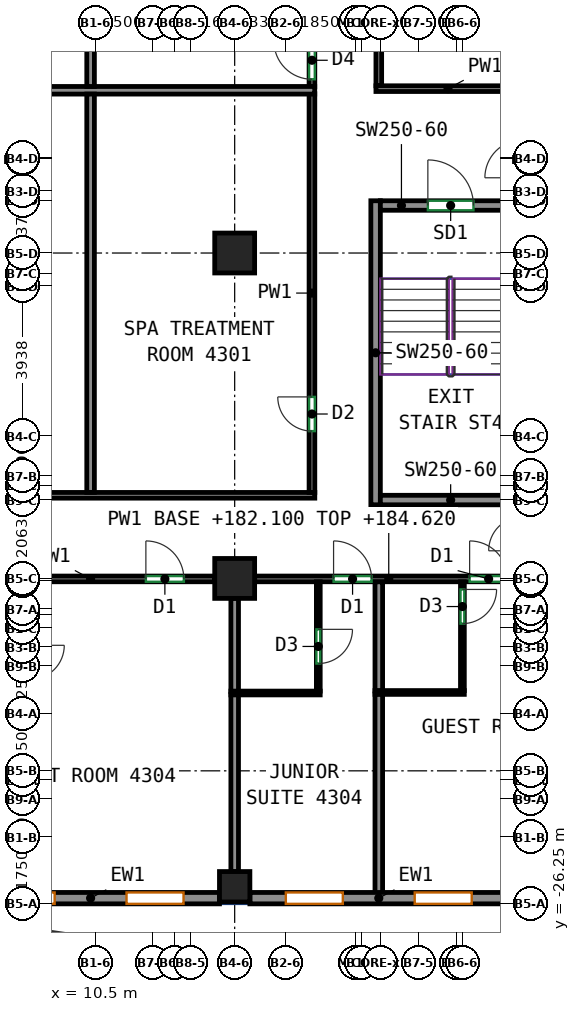
"""IFC4 building model, lengths in metres.
Left out: names, types, materials, properties, quantities, classifications, styles, units other than length and angle.
Written with IfcOpenShell. Run it as: python <this file> out.ifc"""

import sys

from ifc_helpers import new_model, si_unit, direction, frame, frame_2d, origin, origin_2d, place, context, subcontext, project, spatial, rectangle, extrude, source, transform, mapped, element, fill, save


model = new_model("IFC4")
c1 = context("Model", 3, precision=1e-05, world=origin(), true_north=direction((0.0, 1.0)))
c2 = subcontext(c1, "Body", "Model", "MODEL_VIEW")
j1 = project(units=[si_unit("LENGTHUNIT", "METRE"), si_unit("PLANEANGLEUNIT", "RADIAN")], contexts=[c1])
p1 = place(None, origin())
s1 = spatial("IfcSite", under=j1, at=p1, CompositionType="ELEMENT")
p2 = place(p1, origin())
s2 = spatial("IfcBuilding", under=s1, at=p2, CompositionType="ELEMENT")
p3 = place(p2, frame((0.0, 0.0, 182.1)))
s3 = spatial("IfcBuildingStorey", under=s2, at=p3, CompositionType="ELEMENT", Elevation=182.1)
m1 = source(origin(), c2, "Body", "SweptSolid", [
    extrude(rectangle(XDim=0.8, YDim=0.8, at=origin_2d()), origin(), (0.0, 0.0, 1.0), 3.12),
])
p4 = place(p3, frame((14.167, -25.8, 0.0), z_axis=(0.0, 0.0, 1.0), x_axis=(1.0, 0.0, 0.0)))
e1 = element("IfcColumn", 1, at=p4, inside=s3, PredefinedType="COLUMN", context=c2, shape_type="MappedRepresentation", body=[
    mapped(m1, transform((0.0, 0.0, 0.0))),
])
m2 = source(origin(), c2, "Body", "SweptSolid", [
    extrude(rectangle(XDim=1.05, YDim=1.05, at=origin_2d()), origin(), (0.0, 0.0, 1.0), 3.12),
])
for number, where, z_axis, x_axis in (
    (2, (14.167, -17.688, 0.0), (0.0, 0.0, 1.0), (1.0, 0.0, 0.0)),
    (3, (14.167, -9.125, 0.0), (0.0, 0.0, 1.0), (1.0, 0.0, 0.0)),
):
    element("IfcColumn", number, at=place(p3, frame(where, z_axis=z_axis, x_axis=x_axis)), inside=s3, PredefinedType="COLUMN", context=c2, shape_type="MappedRepresentation", body=[
        mapped(m2, transform((0.0, 0.0, 0.0))),
    ])
m3 = source(origin(), c2, "Body", "SweptSolid", [
    extrude(rectangle(XDim=8.0, YDim=0.25, at=frame_2d((4.0, 0.0))), origin(), (0.0, 0.0, 1.0), 3.12),
])
p5 = place(p3, frame((17.875, -15.75, 0.0), z_axis=(0.0, 0.0, 1.0), x_axis=(0.0, 1.0, 0.0)))
e4 = element("IfcWall", 4, at=p5, inside=s3, PredefinedType="SHEAR", context=c2, shape_type="MappedRepresentation", body=[
    mapped(m3, transform((0.0, 0.0, 0.0))),
])
m4 = source(origin(), c2, "Body", "SweptSolid", [
    extrude(rectangle(XDim=3.7, YDim=0.25, at=frame_2d((1.85, 0.0))), origin(), (0.0, 0.0, 1.0), 3.12),
])
p6 = place(p3, frame((18.0, -15.625, 0.0), z_axis=(0.0, 0.0, 1.0), x_axis=(1.0, 0.0, 0.0)))
e5 = element("IfcWall", 5, at=p6, inside=s3, PredefinedType="SHEAR", context=c2, shape_type="MappedRepresentation", body=[
    mapped(m4, transform((0.0, 0.0, 0.0))),
])
p7 = place(p3, frame((18.0, -7.875, 0.0), z_axis=(0.0, 0.0, 1.0), x_axis=(1.0, 0.0, 0.0)))
e6 = element("IfcWall", 6, at=p7, inside=s3, PredefinedType="SHEAR", context=c2, shape_type="MappedRepresentation", body=[
    mapped(m4, transform((0.0, 0.0, 0.0))),
])
p8 = place(p7, frame((1.25, 0.0, 0.0)))
e7 = element("IfcOpeningElement", 7, at=p8, cuts=e6, PredefinedType="OPENING", context=c2, shape_type="SweptSolid", body=[
    extrude(rectangle(XDim=1.2, YDim=2.1, at=frame_2d((0.6, 1.05))), frame((0.0, 0.135, 0.0), z_axis=(0.0, -1.0, 0.0), x_axis=(1.0, 0.0, 0.0)), (0.0, 0.0, 1.0), 0.27),
])
m5 = source(origin(), c2, "Body", "SweptSolid", [
    extrude(rectangle(XDim=6.783, YDim=0.3, at=frame_2d((3.392, 0.0))), origin(), (0.0, 0.0, 1.0), 3.12),
])
p9 = place(p3, frame((6.983, -26.1, 0.0), z_axis=(0.0, 0.0, 1.0), x_axis=(1.0, 0.0, 0.0)))
e8 = element("IfcWall", 8, at=p9, inside=s3, PredefinedType="SOLIDWALL", context=c2, shape_type="MappedRepresentation", body=[
    mapped(m5, transform((0.0, 0.0, 0.0))),
])
p10 = place(p9, frame((0.946, 0.0, 0.85)))
e9 = element("IfcOpeningElement", 9, at=p10, cuts=e8, PredefinedType="OPENING", context=c2, shape_type="SweptSolid", body=[
    extrude(rectangle(XDim=1.5, YDim=1.95, at=frame_2d((0.75, 0.975))), frame((0.0, 0.16, 0.0), z_axis=(0.0, -1.0, 0.0), x_axis=(1.0, 0.0, 0.0)), (0.0, 0.0, 1.0), 0.32),
])
p11 = place(p9, frame((4.338, 0.0, 0.85)))
e10 = element("IfcOpeningElement", 10, at=p11, cuts=e8, PredefinedType="OPENING", context=c2, shape_type="SweptSolid", body=[
    extrude(rectangle(XDim=1.5, YDim=1.95, at=frame_2d((0.75, 0.975))), frame((0.0, 0.16, 0.0), z_axis=(0.0, -1.0, 0.0), x_axis=(1.0, 0.0, 0.0)), (0.0, 0.0, 1.0), 0.32),
])
m6 = source(origin(), c2, "Body", "SweptSolid", [
    extrude(rectangle(XDim=6.783, YDim=0.3, at=frame_2d((3.392, 0.0))), origin(), (0.0, 0.0, 1.0), 3.12),
])
p12 = place(p3, frame((14.567, -26.1, 0.0), z_axis=(0.0, 0.0, 1.0), x_axis=(1.0, 0.0, 0.0)))
e11 = element("IfcWall", 11, at=p12, inside=s3, PredefinedType="SOLIDWALL", context=c2, shape_type="MappedRepresentation", body=[
    mapped(m6, transform((0.0, 0.0, 0.0))),
])
p13 = place(p12, frame((0.946, 0.0, 0.85)))
e12 = element("IfcOpeningElement", 12, at=p13, cuts=e11, PredefinedType="OPENING", context=c2, shape_type="SweptSolid", body=[
    extrude(rectangle(XDim=1.5, YDim=1.95, at=frame_2d((0.75, 0.975))), frame((0.0, 0.16, 0.0), z_axis=(0.0, -1.0, 0.0), x_axis=(1.0, 0.0, 0.0)), (0.0, 0.0, 1.0), 0.32),
])
p14 = place(p12, frame((4.337, 0.0, 0.85)))
e13 = element("IfcOpeningElement", 13, at=p14, cuts=e11, PredefinedType="OPENING", context=c2, shape_type="SweptSolid", body=[
    extrude(rectangle(XDim=1.5, YDim=1.95, at=frame_2d((0.75, 0.975))), frame((0.0, 0.16, 0.0), z_axis=(0.0, -1.0, 0.0), x_axis=(1.0, 0.0, 0.0)), (0.0, 0.0, 1.0), 0.32),
])
p15 = place(p3, frame((7.108, -17.7, 0.0), z_axis=(0.0, 0.0, 1.0), x_axis=(1.0, 0.0, 0.0)))
e14 = element("IfcWall", 14, at=p15, inside=s3, PredefinedType="PARTITIONING", context=c2, shape_type="SweptSolid", body=[
    extrude(rectangle(XDim=6.534, YDim=0.15, at=frame_2d((3.267, 0.0))), origin(), (0.0, 0.0, 1.0), 3.12),
])
p16 = place(p15, frame((4.722, 0.0, 0.0)))
e15 = element("IfcOpeningElement", 15, at=p16, cuts=e14, PredefinedType="OPENING", context=c2, shape_type="SweptSolid", body=[
    extrude(rectangle(XDim=1.0, YDim=2.1, at=frame_2d((0.5, 1.05))), frame((0.0, 0.085, 0.0), z_axis=(0.0, -1.0, 0.0), x_axis=(1.0, 0.0, 0.0)), (0.0, 0.0, 1.0), 0.17),
])
p17 = place(p3, frame((14.692, -17.7, 0.0), z_axis=(0.0, 0.0, 1.0), x_axis=(1.0, 0.0, 0.0)))
e16 = element("IfcWall", 16, at=p17, inside=s3, PredefinedType="PARTITIONING", context=c2, shape_type="SweptSolid", body=[
    extrude(rectangle(XDim=7.058, YDim=0.15, at=frame_2d((3.529, 0.0))), origin(), (0.0, 0.0, 1.0), 2.52),
])
p18 = place(p17, frame((2.077, 0.0, 0.0)))
e17 = element("IfcOpeningElement", 17, at=p18, cuts=e16, PredefinedType="OPENING", context=c2, shape_type="SweptSolid", body=[
    extrude(rectangle(XDim=1.0, YDim=2.1, at=frame_2d((0.5, 1.05))), frame((0.0, 0.085, 0.0), z_axis=(0.0, -1.0, 0.0), x_axis=(1.0, 0.0, 0.0)), (0.0, 0.0, 1.0), 0.17),
])
p19 = place(p17, frame((5.657, 0.0, 0.0)))
e18 = element("IfcOpeningElement", 18, at=p19, cuts=e16, PredefinedType="OPENING", context=c2, shape_type="SweptSolid", body=[
    extrude(rectangle(XDim=1.0, YDim=2.1, at=frame_2d((0.5, 1.05))), frame((0.0, 0.085, 0.0), z_axis=(0.0, -1.0, 0.0), x_axis=(1.0, 0.0, 0.0)), (0.0, 0.0, 1.0), 0.17),
])
p20 = place(p3, frame((17.959, -4.725, 0.0), z_axis=(0.0, 0.0, 1.0), x_axis=(0.0, 1.0, 0.0)))
e19 = element("IfcWall", 19, at=p20, inside=s3, PredefinedType="PARTITIONING", context=c2, shape_type="SweptSolid", body=[
    extrude(rectangle(XDim=8.35, YDim=0.15, at=frame_2d((4.175, 0.0))), origin(), (0.0, 0.0, 1.0), 3.12),
])
p21 = place(p20, frame((4.531, 0.0, 0.0)))
e20 = element("IfcOpeningElement", 20, at=p21, cuts=e19, PredefinedType="OPENING", context=c2, shape_type="SweptSolid", body=[
    extrude(rectangle(XDim=0.9, YDim=2.1, at=frame_2d((0.45, 1.05))), frame((0.0, 0.085, 0.0), z_axis=(0.0, -1.0, 0.0), x_axis=(1.0, 0.0, 0.0)), (0.0, 0.0, 1.0), 0.17),
])
p22 = place(p3, frame((17.884, -4.8, 0.0), z_axis=(0.0, 0.0, 1.0), x_axis=(1.0, 0.0, 0.0)))
e21 = element("IfcWall", 21, at=p22, inside=s3, PredefinedType="PARTITIONING", context=c2, shape_type="SweptSolid", body=[
    extrude(rectangle(XDim=3.793, YDim=0.15, at=frame_2d((1.896, 0.0))), origin(), (0.0, 0.0, 1.0), 3.12),
])
p23 = place(p3, frame((16.2, -4.753, 0.0), z_axis=(0.0, 0.0, 1.0), x_axis=(0.0, 1.0, 0.0)))
e22 = element("IfcWall", 22, at=p23, inside=s3, PredefinedType="PARTITIONING", context=c2, shape_type="SweptSolid", body=[
    extrude(rectangle(XDim=8.378, YDim=0.15, at=frame_2d((4.189, 0.0))), origin(), (0.0, 0.0, 1.0), 3.12),
])
p24 = place(p23, frame((0.2, 0.0, 0.0)))
e23 = element("IfcOpeningElement", 23, at=p24, cuts=e22, PredefinedType="OPENING", context=c2, shape_type="SweptSolid", body=[
    extrude(rectangle(XDim=1.0, YDim=2.1, at=frame_2d((0.5, 1.05))), frame((0.0, 0.085, 0.0), z_axis=(0.0, -1.0, 0.0), x_axis=(1.0, 0.0, 0.0)), (0.0, 0.0, 1.0), 0.17),
])
p25 = place(p3, frame((-4.802, -15.5, 0.0), z_axis=(0.0, 0.0, 1.0), x_axis=(1.0, 0.0, 0.0)))
e24 = element("IfcWall", 24, at=p25, inside=s3, PredefinedType="PARTITIONING", context=c2, shape_type="SweptSolid", body=[
    extrude(rectangle(XDim=21.077, YDim=0.15, at=frame_2d((10.539, 0.0))), origin(), (0.0, 0.0, 1.0), 3.12),
])
p26 = place(p25, frame((6.372, 0.0, 0.0)))
e25 = element("IfcOpeningElement", 25, at=p26, cuts=e24, PredefinedType="OPENING", context=c2, shape_type="SweptSolid", body=[
    extrude(rectangle(XDim=0.9, YDim=2.1, at=frame_2d((0.45, 1.05))), frame((0.0, 0.085, 0.0), z_axis=(0.0, -1.0, 0.0), x_axis=(1.0, 0.0, 0.0)), (0.0, 0.0, 1.0), 0.17),
])
p27 = place(p25, frame((7.815, 0.0, 0.0)))
e26 = element("IfcOpeningElement", 26, at=p27, cuts=e24, PredefinedType="OPENING", context=c2, shape_type="SweptSolid", body=[
    extrude(rectangle(XDim=0.9, YDim=2.1, at=frame_2d((0.45, 1.05))), frame((0.0, 0.085, 0.0), z_axis=(0.0, -1.0, 0.0), x_axis=(1.0, 0.0, 0.0)), (0.0, 0.0, 1.0), 0.17),
])
p28 = place(p3, frame((16.2, -15.425, 0.0), z_axis=(0.0, 0.0, 1.0), x_axis=(0.0, 1.0, 0.0)))
e27 = element("IfcWall", 27, at=p28, inside=s3, PredefinedType="PARTITIONING", context=c2, shape_type="SweptSolid", body=[
    extrude(rectangle(XDim=10.492, YDim=0.15, at=frame_2d((5.246, 0.0))), origin(), (0.0, 0.0, 1.0), 3.12),
])
p29 = place(p28, frame((1.614, 0.0, 0.0)))
e28 = element("IfcOpeningElement", 28, at=p29, cuts=e27, PredefinedType="OPENING", context=c2, shape_type="SweptSolid", body=[
    extrude(rectangle(XDim=0.9, YDim=2.1, at=frame_2d((0.45, 1.05))), frame((0.0, 0.085, 0.0), z_axis=(0.0, -1.0, 0.0), x_axis=(1.0, 0.0, 0.0)), (0.0, 0.0, 1.0), 0.17),
])
p30 = place(p3, frame((14.167, -25.4, 0.0), z_axis=(0.0, 0.0, 1.0), x_axis=(0.0, 1.0, 0.0)))
e29 = element("IfcWall", 29, at=p30, inside=s3, PredefinedType="PARTITIONING", context=c2, shape_type="SweptSolid", body=[
    extrude(rectangle(XDim=4.658, YDim=0.2, at=frame_2d((2.329, 0.0))), origin(), (0.0, 0.0, 1.0), 3.12),
])
p31 = place(p3, frame((14.167, -20.662, 0.0), z_axis=(0.0, 0.0, 1.0), x_axis=(0.0, 1.0, 0.0)))
e30 = element("IfcWall", 30, at=p31, inside=s3, PredefinedType="PARTITIONING", context=c2, shape_type="SweptSolid", body=[
    extrude(rectangle(XDim=2.45, YDim=0.2, at=frame_2d((1.225, 0.0))), origin(), (0.0, 0.0, 1.0), 3.12),
])
p32 = place(p3, frame((16.367, -17.777, 0.0), z_axis=(0.0, 0.0, 1.0), x_axis=(0.0, -1.0, 0.0)))
e31 = element("IfcWall", 31, at=p32, inside=s3, PredefinedType="PARTITIONING", context=c2, shape_type="SweptSolid", body=[
    extrude(rectangle(XDim=2.875, YDim=0.1, at=frame_2d((1.438, 0.0))), origin(), (0.0, 0.0, 1.0), 3.12),
])
p33 = place(p32, frame((1.25, 0.0, 0.0)))
e32 = element("IfcOpeningElement", 32, at=p33, cuts=e31, PredefinedType="OPENING", context=c2, shape_type="SweptSolid", body=[
    extrude(rectangle(XDim=0.9, YDim=2.1, at=frame_2d((0.45, 1.05))), frame((0.0, 0.06, 0.0), z_axis=(0.0, -1.0, 0.0), x_axis=(1.0, 0.0, 0.0)), (0.0, 0.0, 1.0), 0.12),
])
p34 = place(p3, frame((14.067, -20.702, 0.0), z_axis=(0.0, 0.0, 1.0), x_axis=(1.0, 0.0, 0.0)))
e33 = element("IfcWall", 33, at=p34, inside=s3, PredefinedType="PARTITIONING", context=c2, shape_type="SweptSolid", body=[
    extrude(rectangle(XDim=2.35, YDim=0.1, at=frame_2d((1.175, 0.0))), origin(), (0.0, 0.0, 1.0), 3.12),
])
p35 = place(p3, frame((17.959, -26.0, 0.0), z_axis=(0.0, 0.0, 1.0), x_axis=(0.0, 1.0, 0.0)))
e34 = element("IfcWall", 34, at=p35, inside=s3, PredefinedType="PARTITIONING", context=c2, shape_type="SweptSolid", body=[
    extrude(rectangle(XDim=5.272, YDim=0.2, at=frame_2d((2.636, 0.0))), origin(), (0.0, 0.0, 1.0), 3.12),
])
p36 = place(p3, frame((17.959, -20.648, 0.0), z_axis=(0.0, 0.0, 1.0), x_axis=(0.0, 1.0, 0.0)))
e35 = element("IfcWall", 35, at=p36, inside=s3, PredefinedType="PARTITIONING", context=c2, shape_type="SweptSolid", body=[
    extrude(rectangle(XDim=2.871, YDim=0.2, at=frame_2d((1.436, 0.0))), origin(), (0.0, 0.0, 1.0), 3.12),
])
p37 = place(p3, frame((17.859, -20.688, 0.0), z_axis=(0.0, 0.0, 1.0), x_axis=(1.0, 0.0, 0.0)))
e36 = element("IfcWall", 36, at=p37, inside=s3, PredefinedType="PARTITIONING", context=c2, shape_type="SweptSolid", body=[
    extrude(rectangle(XDim=2.35, YDim=0.1, at=frame_2d((1.175, 0.0))), origin(), (0.0, 0.0, 1.0), 3.12),
])
p38 = place(p3, frame((20.159, -17.777, 0.0), z_axis=(0.0, 0.0, 1.0), x_axis=(0.0, -1.0, 0.0)))
e37 = element("IfcWall", 37, at=p38, inside=s3, PredefinedType="PARTITIONING", context=c2, shape_type="SweptSolid", body=[
    extrude(rectangle(XDim=2.861, YDim=0.1, at=frame_2d((1.43, 0.0))), origin(), (0.0, 0.0, 1.0), 3.12),
])
p39 = place(p38, frame((0.2, 0.0, 0.0)))
e38 = element("IfcOpeningElement", 38, at=p39, cuts=e37, PredefinedType="OPENING", context=c2, shape_type="SweptSolid", body=[
    extrude(rectangle(XDim=0.9, YDim=2.1, at=frame_2d((0.45, 1.05))), frame((0.0, 0.06, 0.0), z_axis=(0.0, -1.0, 0.0), x_axis=(1.0, 0.0, 0.0)), (0.0, 0.0, 1.0), 0.12),
])
p40 = place(p3, frame((-13.873, -4.843, 0.0), z_axis=(0.0, 0.0, 1.0), x_axis=(1.0, 0.0, 0.0)))
e39 = element("IfcWall", 39, at=p40, inside=s3, PredefinedType="PARTITIONING", context=c2, shape_type="SweptSolid", body=[
    extrude(rectangle(XDim=30.146, YDim=0.2, at=frame_2d((15.073, 0.0))), origin(), (0.0, 0.0, 1.0), 3.12),
])
p41 = place(p3, frame((10.375, -4.743, 0.0), z_axis=(0.0, 0.0, 1.0), x_axis=(0.0, 1.0, 0.0)))
e40 = element("IfcWall", 40, at=p41, inside=s3, PredefinedType="PARTITIONING", context=c2, shape_type="SweptSolid", body=[
    extrude(rectangle(XDim=8.366, YDim=0.2, at=frame_2d((4.183, 0.0))), origin(), (0.0, 0.0, 1.0), 3.12),
])
p42 = place(p3, frame((10.375, -15.423, 0.0), z_axis=(0.0, 0.0, 1.0), x_axis=(0.0, 1.0, 0.0)))
e41 = element("IfcWall", 41, at=p42, inside=s3, PredefinedType="PARTITIONING", context=c2, shape_type="SweptSolid", body=[
    extrude(rectangle(XDim=10.48, YDim=0.2, at=frame_2d((5.24, 0.0))), origin(), (0.0, 0.0, 1.0), 3.12),
])
p43 = place(p10, origin())
e42 = element("IfcWindow", 42, at=p43, inside=s3, PartitioningType="SINGLE_PANEL", PredefinedType="WINDOW", context=c2, shape_type="SweptSolid", body=[
    extrude(rectangle(XDim=1.5, YDim=1.95, at=frame_2d((0.75, 0.975))), frame((0.0, 0.03, 0.0), z_axis=(0.0, -1.0, 0.0), x_axis=(1.0, 0.0, 0.0)), (0.0, 0.0, 1.0), 0.06),
])
fill(e9, e42)
p44 = place(p11, origin())
e43 = element("IfcWindow", 43, at=p44, inside=s3, PartitioningType="SINGLE_PANEL", PredefinedType="WINDOW", context=c2, shape_type="SweptSolid", body=[
    extrude(rectangle(XDim=1.5, YDim=1.95, at=frame_2d((0.75, 0.975))), frame((0.0, 0.03, 0.0), z_axis=(0.0, -1.0, 0.0), x_axis=(1.0, 0.0, 0.0)), (0.0, 0.0, 1.0), 0.06),
])
fill(e10, e43)
p45 = place(p13, origin())
e44 = element("IfcWindow", 44, at=p45, inside=s3, PartitioningType="SINGLE_PANEL", PredefinedType="WINDOW", context=c2, shape_type="SweptSolid", body=[
    extrude(rectangle(XDim=1.5, YDim=1.95, at=frame_2d((0.75, 0.975))), frame((0.0, 0.03, 0.0), z_axis=(0.0, -1.0, 0.0), x_axis=(1.0, 0.0, 0.0)), (0.0, 0.0, 1.0), 0.06),
])
fill(e12, e44)
p46 = place(p14, origin())
e45 = element("IfcWindow", 45, at=p46, inside=s3, PartitioningType="SINGLE_PANEL", PredefinedType="WINDOW", context=c2, shape_type="SweptSolid", body=[
    extrude(rectangle(XDim=1.5, YDim=1.95, at=frame_2d((0.75, 0.975))), frame((0.0, 0.03, 0.0), z_axis=(0.0, -1.0, 0.0), x_axis=(1.0, 0.0, 0.0)), (0.0, 0.0, 1.0), 0.06),
])
fill(e13, e45)
p47 = place(p8, origin())
e46 = element("IfcDoor", 46, at=p47, inside=s3, OperationType="DOUBLE_DOOR_SINGLE_SWING", PredefinedType="DOOR", context=c2, shape_type="SweptSolid", body=[
    extrude(rectangle(XDim=1.2, YDim=2.1, at=frame_2d((0.6, 1.05))), frame((0.0, 0.025, 0.0), z_axis=(0.0, -1.0, 0.0), x_axis=(1.0, 0.0, 0.0)), (0.0, 0.0, 1.0), 0.05),
])
fill(e7, e46)
p48 = place(p33, origin())
e47 = element("IfcDoor", 47, at=p48, inside=s3, OperationType="SINGLE_SWING_LEFT", PredefinedType="DOOR", context=c2, shape_type="SweptSolid", body=[
    extrude(rectangle(XDim=0.9, YDim=2.1, at=frame_2d((0.45, 1.05))), frame((0.0, 0.025, 0.0), z_axis=(0.0, -1.0, 0.0), x_axis=(1.0, 0.0, 0.0)), (0.0, 0.0, 1.0), 0.05),
])
fill(e32, e47)
p49 = place(p39, origin())
e48 = element("IfcDoor", 48, at=p49, inside=s3, OperationType="SINGLE_SWING_LEFT", PredefinedType="DOOR", context=c2, shape_type="SweptSolid", body=[
    extrude(rectangle(XDim=0.9, YDim=2.1, at=frame_2d((0.45, 1.05))), frame((0.0, 0.025, 0.0), z_axis=(0.0, -1.0, 0.0), x_axis=(1.0, 0.0, 0.0)), (0.0, 0.0, 1.0), 0.05),
])
fill(e38, e48)
p50 = place(p16, origin())
e49 = element("IfcDoor", 49, at=p50, inside=s3, OperationType="SINGLE_SWING_LEFT", PredefinedType="DOOR", context=c2, shape_type="SweptSolid", body=[
    extrude(rectangle(XDim=1.0, YDim=2.1, at=frame_2d((0.5, 1.05))), frame((0.0, 0.025, 0.0), z_axis=(0.0, -1.0, 0.0), x_axis=(1.0, 0.0, 0.0)), (0.0, 0.0, 1.0), 0.05),
])
fill(e15, e49)
p51 = place(p18, origin())
e50 = element("IfcDoor", 50, at=p51, inside=s3, OperationType="SINGLE_SWING_LEFT", PredefinedType="DOOR", context=c2, shape_type="SweptSolid", body=[
    extrude(rectangle(XDim=1.0, YDim=2.1, at=frame_2d((0.5, 1.05))), frame((0.0, 0.025, 0.0), z_axis=(0.0, -1.0, 0.0), x_axis=(1.0, 0.0, 0.0)), (0.0, 0.0, 1.0), 0.05),
])
fill(e17, e50)
p52 = place(p19, origin())
e51 = element("IfcDoor", 51, at=p52, inside=s3, OperationType="SINGLE_SWING_LEFT", PredefinedType="DOOR", context=c2, shape_type="SweptSolid", body=[
    extrude(rectangle(XDim=1.0, YDim=2.1, at=frame_2d((0.5, 1.05))), frame((0.0, 0.025, 0.0), z_axis=(0.0, -1.0, 0.0), x_axis=(1.0, 0.0, 0.0)), (0.0, 0.0, 1.0), 0.05),
])
fill(e18, e51)
p53 = place(p29, origin())
e52 = element("IfcDoor", 52, at=p53, inside=s3, OperationType="SINGLE_SWING_RIGHT", PredefinedType="DOOR", context=c2, shape_type="SweptSolid", body=[
    extrude(rectangle(XDim=0.9, YDim=2.1, at=frame_2d((0.45, 1.05))), frame((0.0, 0.025, 0.0), z_axis=(0.0, -1.0, 0.0), x_axis=(1.0, 0.0, 0.0)), (0.0, 0.0, 1.0), 0.05),
])
fill(e28, e52)
p54 = place(p24, origin())
e53 = element("IfcDoor", 53, at=p54, inside=s3, OperationType="SINGLE_SWING_RIGHT", PredefinedType="DOOR", context=c2, shape_type="SweptSolid", body=[
    extrude(rectangle(XDim=1.0, YDim=2.1, at=frame_2d((0.5, 1.05))), frame((0.0, 0.025, 0.0), z_axis=(0.0, -1.0, 0.0), x_axis=(1.0, 0.0, 0.0)), (0.0, 0.0, 1.0), 0.05),
])
fill(e23, e53)
save(model, sys.argv[1])
